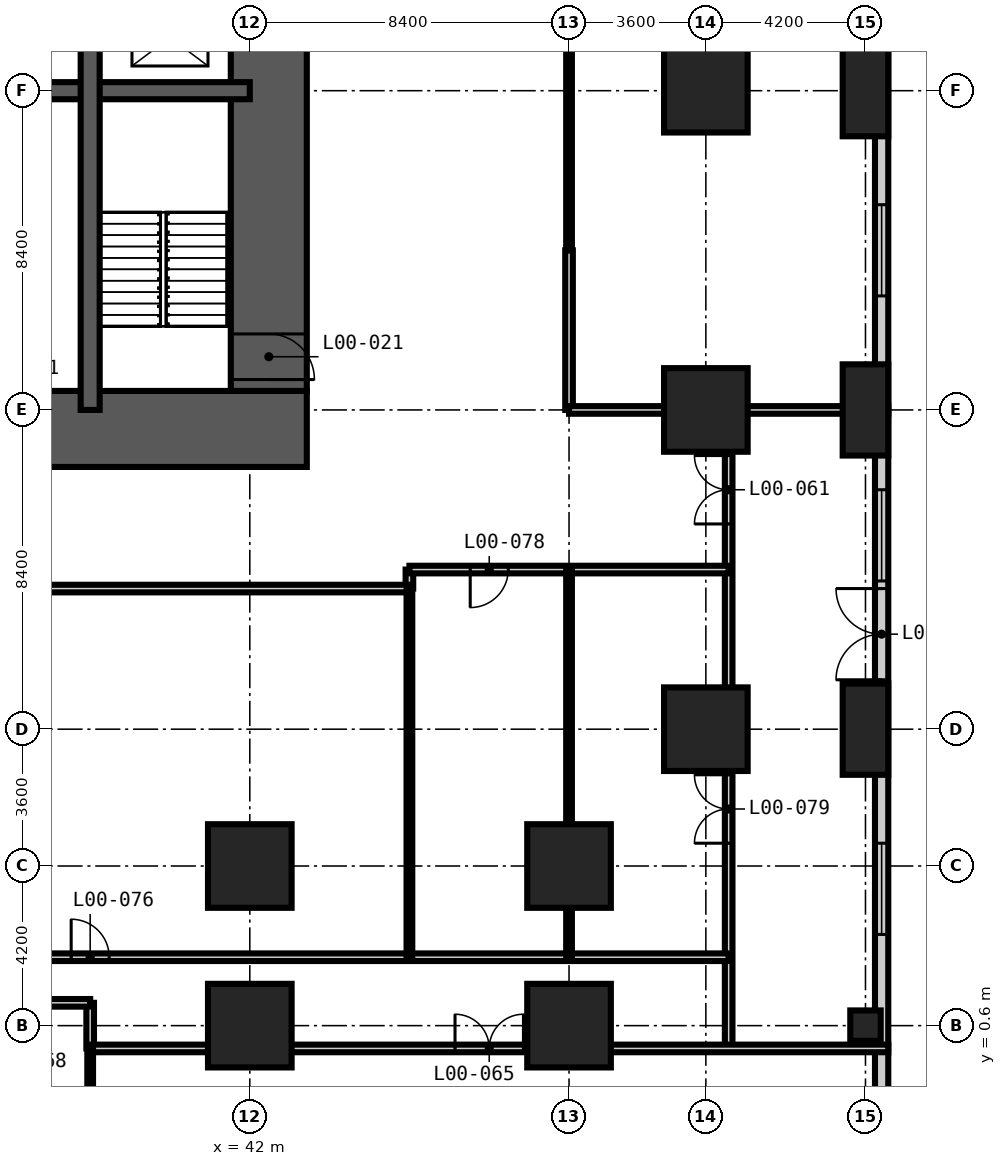
"""IFC4 building model, lengths in metres.
Left out: names, types, materials, properties, quantities, classifications, styles, units other than length and angle.
Written with IfcOpenShell. Run it as: python <this file> out.ifc"""

import sys

from ifc_helpers import new_model, si_unit, direction, frame, frame_2d, origin, origin_2d, place, context, subcontext, project, spatial, rectangle, extrude, element, fill, save


model = new_model("IFC4")
c1 = context("Model", 3, precision=1e-05, world=origin(), true_north=direction((0.0, 1.0)))
c2 = subcontext(c1, "Body", "Model", "MODEL_VIEW")
j1 = project(units=[si_unit("LENGTHUNIT", "METRE"), si_unit("PLANEANGLEUNIT", "RADIAN")], contexts=[c1])
p1 = place(None, origin())
s1 = spatial("IfcSite", under=j1, at=p1, CompositionType="ELEMENT")
p2 = place(p1, origin())
s2 = spatial("IfcBuilding", under=s1, at=p2, CompositionType="ELEMENT")
p3 = place(p2, origin())
s3 = spatial("IfcBuildingStorey", under=s2, at=p3, CompositionType="ELEMENT", Elevation=0.0)
for number, where, z_axis, x_axis in (
    (1, (42.0, 0.6, -0.3), (0.0, 0.0, 1.0), (1.0, 0.0, 0.0)),
    (2, (42.0, 4.8, -0.3), (0.0, 0.0, 1.0), (1.0, 0.0, 0.0)),
    (3, (50.4, 0.6, -0.3), (0.0, 0.0, 1.0), (1.0, 0.0, 0.0)),
    (4, (50.4, 4.8, -0.3), (0.0, 0.0, 1.0), (1.0, 0.0, 0.0)),
    (5, (54.0, 8.4, -0.3), (0.0, 0.0, 1.0), (1.0, 0.0, 0.0)),
    (6, (54.0, 16.8, -0.3), (0.0, 0.0, 1.0), (1.0, 0.0, 0.0)),
    (7, (54.0, 25.2, -0.3), (0.0, 0.0, 1.0), (1.0, 0.0, 0.0)),
):
    element("IfcColumn", number, at=place(p3, frame(where, z_axis=z_axis, x_axis=x_axis)), inside=s3, PredefinedType="COLUMN", context=c2, shape_type="SweptSolid", body=[
        extrude(rectangle(XDim=2.2, YDim=2.2, at=origin_2d()), origin(), (0.0, 0.0, 1.0), 6.0),
    ])
for number, where, z_axis, x_axis in (
    (8, (58.2, 8.4, -0.3), (0.0, 0.0, 1.0), (1.0, 0.0, 0.0)),
    (9, (58.2, 16.8, -0.3), (0.0, 0.0, 1.0), (1.0, 0.0, 0.0)),
    (10, (58.2, 25.2, -0.3), (0.0, 0.0, 1.0), (1.0, 0.0, 0.0)),
):
    element("IfcColumn", number, at=place(p3, frame(where, z_axis=z_axis, x_axis=x_axis)), inside=s3, PredefinedType="COLUMN", context=c2, shape_type="SweptSolid", body=[
        extrude(rectangle(XDim=1.2, YDim=2.4, at=origin_2d()), origin(), (0.0, 0.0, 1.0), 6.0),
    ])
p4 = place(p3, frame((58.2, 0.6, -0.3), z_axis=(0.0, 0.0, 1.0), x_axis=(1.0, 0.0, 0.0)))
e11 = element("IfcColumn", 11, at=p4, inside=s3, PredefinedType="COLUMN", context=c2, shape_type="SweptSolid", body=[
    extrude(rectangle(XDim=0.8, YDim=0.8, at=origin_2d()), origin(), (0.0, 0.0, 1.0), 6.0),
])
p5 = place(p3, frame((15.3, 16.3, -0.3), z_axis=(0.0, 0.0, 1.0), x_axis=(1.0, 0.0, 0.0)))
e12 = element("IfcWall", 12, at=p5, inside=s3, PredefinedType="SHEAR", context=c2, shape_type="SweptSolid", body=[
    extrude(rectangle(XDim=28.2, YDim=2.0, at=frame_2d((14.1, 0.0))), origin(), (0.0, 0.0, 1.0), 6.0),
])
p6 = place(p5, frame((13.6, 0.0, 0.3)))
e13 = element("IfcOpeningElement", 13, at=p6, cuts=e12, PredefinedType="OPENING", context=c2, shape_type="SweptSolid", body=[
    extrude(rectangle(XDim=1.0, YDim=2.1, at=frame_2d((0.5, 1.05))), frame((0.0, 1.01, 0.0), z_axis=(0.0, -1.0, 0.0), x_axis=(1.0, 0.0, 0.0)), (0.0, 0.0, 1.0), 2.02),
])
p7 = place(p5, frame((19.9, 0.0, 0.3)))
e14 = element("IfcOpeningElement", 14, at=p7, cuts=e12, PredefinedType="OPENING", context=c2, shape_type="SweptSolid", body=[
    extrude(rectangle(XDim=1.0, YDim=2.1, at=frame_2d((0.5, 1.05))), frame((0.0, 1.01, 0.0), z_axis=(0.0, -1.0, 0.0), x_axis=(1.0, 0.0, 0.0)), (0.0, 0.0, 1.0), 2.02),
])
p8 = place(p3, frame((42.5, 17.3, -0.3), z_axis=(0.0, 0.0, 1.0), x_axis=(0.0, 1.0, 0.0)))
e15 = element("IfcWall", 15, at=p8, inside=s3, PredefinedType="SHEAR", context=c2, shape_type="SweptSolid", body=[
    extrude(rectangle(XDim=24.2, YDim=2.0, at=frame_2d((12.1, 0.0))), origin(), (0.0, 0.0, 1.0), 6.0),
])
p9 = place(p8, frame((0.3, 0.0, 0.3)))
e16 = element("IfcOpeningElement", 16, at=p9, cuts=e15, PredefinedType="OPENING", context=c2, shape_type="SweptSolid", body=[
    extrude(rectangle(XDim=1.2, YDim=2.2, at=frame_2d((0.6, 1.1))), frame((0.0, 1.01, 0.0), z_axis=(0.0, -1.0, 0.0), x_axis=(1.0, 0.0, 0.0)), (0.0, 0.0, 1.0), 2.02),
])
p10 = place(p8, frame((11.2, 0.0, 0.3)))
e17 = element("IfcOpeningElement", 17, at=p10, cuts=e15, PredefinedType="OPENING", context=c2, shape_type="SweptSolid", body=[
    extrude(rectangle(XDim=1.8, YDim=2.2, at=frame_2d((0.9, 1.1))), frame((0.0, 1.01, 0.0), z_axis=(0.0, -1.0, 0.0), x_axis=(1.0, 0.0, 0.0)), (0.0, 0.0, 1.0), 2.02),
])
p11 = place(p8, frame((20.0, 0.0, 0.3)))
e18 = element("IfcOpeningElement", 18, at=p11, cuts=e15, PredefinedType="OPENING", context=c2, shape_type="SweptSolid", body=[
    extrude(rectangle(XDim=1.0, YDim=2.1, at=frame_2d((0.5, 1.05))), frame((0.0, 1.01, 0.0), z_axis=(0.0, -1.0, 0.0), x_axis=(1.0, 0.0, 0.0)), (0.0, 0.0, 1.0), 2.02),
])
p12 = place(p3, frame((58.625, -8.4, 0.0), z_axis=(0.0, 0.0, 1.0), x_axis=(0.0, 1.0, 0.0)))
e19 = element("IfcWall", 19, at=p12, inside=s3, PredefinedType="SOLIDWALL", context=c2, shape_type="SweptSolid", body=[
    extrude(rectangle(XDim=67.2, YDim=0.35, at=frame_2d((33.6, 0.0))), origin(), (0.0, 0.0, 1.0), 5.7),
])
p13 = place(p12, frame((3.0, 0.0, 0.9)))
e20 = element("IfcOpeningElement", 20, at=p13, cuts=e19, PredefinedType="OPENING", context=c2, shape_type="SweptSolid", body=[
    extrude(rectangle(XDim=2.4, YDim=2.4, at=frame_2d((1.2, 1.2))), frame((0.0, 0.185, 0.0), z_axis=(0.0, -1.0, 0.0), x_axis=(1.0, 0.0, 0.0)), (0.0, 0.0, 1.0), 0.37),
])
p14 = place(p12, frame((18.1, 0.0, 0.0)))
e21 = element("IfcOpeningElement", 21, at=p14, cuts=e19, PredefinedType="OPENING", context=c2, shape_type="SweptSolid", body=[
    extrude(rectangle(XDim=2.4, YDim=3.0, at=frame_2d((1.2, 1.5))), frame((0.0, 0.185, 0.0), z_axis=(0.0, -1.0, 0.0), x_axis=(1.0, 0.0, 0.0)), (0.0, 0.0, 1.0), 0.37),
])
p15 = place(p12, frame((11.4, 0.0, 0.9)))
e22 = element("IfcOpeningElement", 22, at=p15, cuts=e19, PredefinedType="OPENING", context=c2, shape_type="SweptSolid", body=[
    extrude(rectangle(XDim=2.4, YDim=2.4, at=frame_2d((1.2, 1.2))), frame((0.0, 0.185, 0.0), z_axis=(0.0, -1.0, 0.0), x_axis=(1.0, 0.0, 0.0)), (0.0, 0.0, 1.0), 0.37),
])
p16 = place(p12, frame((20.7, 0.0, 0.9)))
e23 = element("IfcOpeningElement", 23, at=p16, cuts=e19, PredefinedType="OPENING", context=c2, shape_type="SweptSolid", body=[
    extrude(rectangle(XDim=2.4, YDim=2.4, at=frame_2d((1.2, 1.2))), frame((0.0, 0.185, 0.0), z_axis=(0.0, -1.0, 0.0), x_axis=(1.0, 0.0, 0.0)), (0.0, 0.0, 1.0), 0.37),
])
p17 = place(p12, frame((28.2, 0.0, 0.9)))
e24 = element("IfcOpeningElement", 24, at=p17, cuts=e19, PredefinedType="OPENING", context=c2, shape_type="SweptSolid", body=[
    extrude(rectangle(XDim=2.4, YDim=2.4, at=frame_2d((1.2, 1.2))), frame((0.0, 0.185, 0.0), z_axis=(0.0, -1.0, 0.0), x_axis=(1.0, 0.0, 0.0)), (0.0, 0.0, 1.0), 0.37),
])
p18 = place(p12, frame((36.6, 0.0, 0.9)))
e25 = element("IfcOpeningElement", 25, at=p18, cuts=e19, PredefinedType="OPENING", context=c2, shape_type="SweptSolid", body=[
    extrude(rectangle(XDim=2.4, YDim=2.4, at=frame_2d((1.2, 1.2))), frame((0.0, 0.185, 0.0), z_axis=(0.0, -1.0, 0.0), x_axis=(1.0, 0.0, 0.0)), (0.0, 0.0, 1.0), 0.37),
])
p19 = place(p12, frame((45.0, 0.0, 0.9)))
e26 = element("IfcOpeningElement", 26, at=p19, cuts=e19, PredefinedType="OPENING", context=c2, shape_type="SweptSolid", body=[
    extrude(rectangle(XDim=2.4, YDim=2.4, at=frame_2d((1.2, 1.2))), frame((0.0, 0.185, 0.0), z_axis=(0.0, -1.0, 0.0), x_axis=(1.0, 0.0, 0.0)), (0.0, 0.0, 1.0), 0.37),
])
p20 = place(p12, frame((60.1, 0.0, 0.0)))
e27 = element("IfcOpeningElement", 27, at=p20, cuts=e19, PredefinedType="OPENING", context=c2, shape_type="SweptSolid", body=[
    extrude(rectangle(XDim=3.6, YDim=4.5, at=frame_2d((1.8, 2.25))), frame((0.0, 0.185, 0.0), z_axis=(0.0, -1.0, 0.0), x_axis=(1.0, 0.0, 0.0)), (0.0, 0.0, 1.0), 0.37),
])
p21 = place(p12, frame((53.4, 0.0, 0.9)))
e28 = element("IfcOpeningElement", 28, at=p21, cuts=e19, PredefinedType="OPENING", context=c2, shape_type="SweptSolid", body=[
    extrude(rectangle(XDim=2.4, YDim=2.4, at=frame_2d((1.2, 1.2))), frame((0.0, 0.185, 0.0), z_axis=(0.0, -1.0, 0.0), x_axis=(1.0, 0.0, 0.0)), (0.0, 0.0, 1.0), 0.37),
])
p22 = place(p3, frame((16.8, 25.2, -0.3), z_axis=(0.0, 0.0, 1.0), x_axis=(1.0, 0.0, 0.0)))
e29 = element("IfcWall", 29, at=p22, inside=s3, PredefinedType="SHEAR", context=c2, shape_type="SweptSolid", body=[
    extrude(rectangle(XDim=25.2, YDim=0.45, at=frame_2d((12.6, 0.0))), origin(), (0.0, 0.0, 1.0), 6.0),
])
p23 = place(p3, frame((37.8, 16.8, -0.3), z_axis=(0.0, 0.0, 1.0), x_axis=(0.0, 1.0, 0.0)))
e30 = element("IfcWall", 30, at=p23, inside=s3, PredefinedType="SHEAR", context=c2, shape_type="SweptSolid", body=[
    extrude(rectangle(XDim=11.2, YDim=0.5, at=frame_2d((5.6, 0.0))), origin(), (0.0, 0.0, 1.0), 6.0),
])
p24 = place(p3, frame((37.8, 0.0, 0.0), z_axis=(0.0, 0.0, 1.0), x_axis=(0.0, 1.0, 0.0)))
e31 = element("IfcWall", 31, at=p24, inside=s3, PredefinedType="PARTITIONING", context=c2, shape_type="SweptSolid", body=[
    extrude(rectangle(XDim=1.2, YDim=0.2, at=frame_2d((0.6, 0.0))), origin(), (0.0, 0.0, 1.0), 5.7),
])
p25 = place(p3, frame((46.2, 12.1, 0.0), z_axis=(0.0, 0.0, 1.0), x_axis=(0.0, 1.0, 0.0)))
e32 = element("IfcWall", 32, at=p25, inside=s3, PredefinedType="PARTITIONING", context=c2, shape_type="SweptSolid", body=[
    extrude(rectangle(XDim=0.5, YDim=0.2, at=frame_2d((0.25, 0.0))), origin(), (0.0, 0.0, 1.0), 5.7),
])
p26 = place(p3, frame((50.4, 16.8, 0.0), z_axis=(0.0, 0.0, 1.0), x_axis=(0.0, 1.0, 0.0)))
e33 = element("IfcWall", 33, at=p26, inside=s3, PredefinedType="PARTITIONING", context=c2, shape_type="SweptSolid", body=[
    extrude(rectangle(XDim=4.2, YDim=0.2, at=frame_2d((2.1, 0.0))), origin(), (0.0, 0.0, 1.0), 5.7),
])
p27 = place(p3, frame((54.6, 0.0, 0.0), z_axis=(0.0, 0.0, 1.0), x_axis=(0.0, 1.0, 0.0)))
e34 = element("IfcWall", 34, at=p27, inside=s3, PredefinedType="PARTITIONING", context=c2, shape_type="SweptSolid", body=[
    extrude(rectangle(XDim=16.8, YDim=0.2, at=frame_2d((8.4, 0.0))), origin(), (0.0, 0.0, 1.0), 5.7),
])
p28 = place(p27, frame((13.8, 0.0, 0.0)))
e35 = element("IfcOpeningElement", 35, at=p28, cuts=e34, PredefinedType="OPENING", context=c2, shape_type="SweptSolid", body=[
    extrude(rectangle(XDim=1.8, YDim=2.4, at=frame_2d((0.9, 1.2))), frame((0.0, 0.11, 0.0), z_axis=(0.0, -1.0, 0.0), x_axis=(1.0, 0.0, 0.0)), (0.0, 0.0, 1.0), 0.22),
])
p29 = place(p27, frame((5.4, 0.0, 0.0)))
e36 = element("IfcOpeningElement", 36, at=p29, cuts=e34, PredefinedType="OPENING", context=c2, shape_type="SweptSolid", body=[
    extrude(rectangle(XDim=1.8, YDim=2.4, at=frame_2d((0.9, 1.2))), frame((0.0, 0.11, 0.0), z_axis=(0.0, -1.0, 0.0), x_axis=(1.0, 0.0, 0.0)), (0.0, 0.0, 1.0), 0.22),
])
p30 = place(p3, frame((37.8, 0.0, 0.0), z_axis=(0.0, 0.0, 1.0), x_axis=(1.0, 0.0, 0.0)))
e37 = element("IfcWall", 37, at=p30, inside=s3, PredefinedType="PARTITIONING", context=c2, shape_type="SweptSolid", body=[
    extrude(rectangle(XDim=21.0, YDim=0.2, at=frame_2d((10.5, 0.0))), origin(), (0.0, 0.0, 1.0), 5.7),
])
p31 = place(p30, frame((9.6, 0.0, 0.0)))
e38 = element("IfcOpeningElement", 38, at=p31, cuts=e37, PredefinedType="OPENING", context=c2, shape_type="SweptSolid", body=[
    extrude(rectangle(XDim=1.8, YDim=2.4, at=frame_2d((0.9, 1.2))), frame((0.0, 0.11, 0.0), z_axis=(0.0, -1.0, 0.0), x_axis=(1.0, 0.0, 0.0)), (0.0, 0.0, 1.0), 0.22),
])
p32 = place(p3, frame((33.6, 1.2, 0.0), z_axis=(0.0, 0.0, 1.0), x_axis=(1.0, 0.0, 0.0)))
e39 = element("IfcWall", 39, at=p32, inside=s3, PredefinedType="PARTITIONING", context=c2, shape_type="SweptSolid", body=[
    extrude(rectangle(XDim=4.2, YDim=0.2, at=frame_2d((2.1, 0.0))), origin(), (0.0, 0.0, 1.0), 5.7),
])
p33 = place(p32, frame((1.6, 0.0, 0.0)))
e40 = element("IfcOpeningElement", 40, at=p33, cuts=e39, PredefinedType="OPENING", context=c2, shape_type="SweptSolid", body=[
    extrude(rectangle(XDim=1.0, YDim=2.1, at=frame_2d((0.5, 1.05))), frame((0.0, 0.11, 0.0), z_axis=(0.0, -1.0, 0.0), x_axis=(1.0, 0.0, 0.0)), (0.0, 0.0, 1.0), 0.22),
])
p34 = place(p3, frame((0.0, 2.4, 0.0), z_axis=(0.0, 0.0, 1.0), x_axis=(1.0, 0.0, 0.0)))
e41 = element("IfcWall", 41, at=p34, inside=s3, PredefinedType="PARTITIONING", context=c2, shape_type="SweptSolid", body=[
    extrude(rectangle(XDim=54.6, YDim=0.2, at=frame_2d((27.3, 0.0))), origin(), (0.0, 0.0, 1.0), 5.7),
])
p35 = place(p34, frame((5.8, 0.0, 0.0)))
e42 = element("IfcOpeningElement", 42, at=p35, cuts=e41, PredefinedType="OPENING", context=c2, shape_type="SweptSolid", body=[
    extrude(rectangle(XDim=1.0, YDim=2.1, at=frame_2d((0.5, 1.05))), frame((0.0, 0.11, 0.0), z_axis=(0.0, -1.0, 0.0), x_axis=(1.0, 0.0, 0.0)), (0.0, 0.0, 1.0), 0.22),
])
p36 = place(p34, frame((18.4, 0.0, 0.0)))
e43 = element("IfcOpeningElement", 43, at=p36, cuts=e41, PredefinedType="OPENING", context=c2, shape_type="SweptSolid", body=[
    extrude(rectangle(XDim=1.0, YDim=2.1, at=frame_2d((0.5, 1.05))), frame((0.0, 0.11, 0.0), z_axis=(0.0, -1.0, 0.0), x_axis=(1.0, 0.0, 0.0)), (0.0, 0.0, 1.0), 0.22),
])
p37 = place(p34, frame((28.9, 0.0, 0.0)))
e44 = element("IfcOpeningElement", 44, at=p37, cuts=e41, PredefinedType="OPENING", context=c2, shape_type="SweptSolid", body=[
    extrude(rectangle(XDim=1.0, YDim=2.1, at=frame_2d((0.5, 1.05))), frame((0.0, 0.11, 0.0), z_axis=(0.0, -1.0, 0.0), x_axis=(1.0, 0.0, 0.0)), (0.0, 0.0, 1.0), 0.22),
])
p38 = place(p34, frame((37.3, 0.0, 0.0)))
e45 = element("IfcOpeningElement", 45, at=p38, cuts=e41, PredefinedType="OPENING", context=c2, shape_type="SweptSolid", body=[
    extrude(rectangle(XDim=1.0, YDim=2.1, at=frame_2d((0.5, 1.05))), frame((0.0, 0.11, 0.0), z_axis=(0.0, -1.0, 0.0), x_axis=(1.0, 0.0, 0.0)), (0.0, 0.0, 1.0), 0.22),
])
p39 = place(p3, frame((12.6, 12.1, 0.0), z_axis=(0.0, 0.0, 1.0), x_axis=(1.0, 0.0, 0.0)))
e46 = element("IfcWall", 46, at=p39, inside=s3, PredefinedType="PARTITIONING", context=c2, shape_type="SweptSolid", body=[
    extrude(rectangle(XDim=33.6, YDim=0.2, at=frame_2d((16.8, 0.0))), origin(), (0.0, 0.0, 1.0), 5.7),
])
p40 = place(p3, frame((46.2, 12.6, 0.0), z_axis=(0.0, 0.0, 1.0), x_axis=(1.0, 0.0, 0.0)))
e47 = element("IfcWall", 47, at=p40, inside=s3, PredefinedType="PARTITIONING", context=c2, shape_type="SweptSolid", body=[
    extrude(rectangle(XDim=8.4, YDim=0.2, at=frame_2d((4.2, 0.0))), origin(), (0.0, 0.0, 1.0), 5.7),
])
p41 = place(p40, frame((1.6, 0.0, 0.0)))
e48 = element("IfcOpeningElement", 48, at=p41, cuts=e47, PredefinedType="OPENING", context=c2, shape_type="SweptSolid", body=[
    extrude(rectangle(XDim=1.0, YDim=2.1, at=frame_2d((0.5, 1.05))), frame((0.0, 0.11, 0.0), z_axis=(0.0, -1.0, 0.0), x_axis=(1.0, 0.0, 0.0)), (0.0, 0.0, 1.0), 0.22),
])
p42 = place(p3, frame((50.4, 16.8, 0.0), z_axis=(0.0, 0.0, 1.0), x_axis=(1.0, 0.0, 0.0)))
e49 = element("IfcWall", 49, at=p42, inside=s3, PredefinedType="PARTITIONING", context=c2, shape_type="SweptSolid", body=[
    extrude(rectangle(XDim=8.4, YDim=0.2, at=frame_2d((4.2, 0.0))), origin(), (0.0, 0.0, 1.0), 5.7),
])
p43 = place(p3, frame((37.8, -8.4, 0.0), z_axis=(0.0, 0.0, 1.0), x_axis=(0.0, 1.0, 0.0)))
e50 = element("IfcWall", 50, at=p43, inside=s3, PredefinedType="PARTITIONING", context=c2, shape_type="SweptSolid", body=[
    extrude(rectangle(XDim=8.4, YDim=0.15, at=frame_2d((4.2, 0.0))), origin(), (0.0, 0.0, 1.0), 5.7),
])
p44 = place(p3, frame((46.2, 2.4, 0.0), z_axis=(0.0, 0.0, 1.0), x_axis=(0.0, 1.0, 0.0)))
e51 = element("IfcWall", 51, at=p44, inside=s3, PredefinedType="PARTITIONING", context=c2, shape_type="SweptSolid", body=[
    extrude(rectangle(XDim=9.7, YDim=0.15, at=frame_2d((4.85, 0.0))), origin(), (0.0, 0.0, 1.0), 5.7),
])
p45 = place(p3, frame((50.4, 2.4, 0.0), z_axis=(0.0, 0.0, 1.0), x_axis=(0.0, 1.0, 0.0)))
e52 = element("IfcWall", 52, at=p45, inside=s3, PredefinedType="PARTITIONING", context=c2, shape_type="SweptSolid", body=[
    extrude(rectangle(XDim=10.2, YDim=0.15, at=frame_2d((5.1, 0.0))), origin(), (0.0, 0.0, 1.0), 5.7),
])
p46 = place(p3, frame((50.4, 21.0, 0.0), z_axis=(0.0, 0.0, 1.0), x_axis=(0.0, 1.0, 0.0)))
e53 = element("IfcWall", 53, at=p46, inside=s3, PredefinedType="PARTITIONING", context=c2, shape_type="SweptSolid", body=[
    extrude(rectangle(XDim=12.6, YDim=0.15, at=frame_2d((6.3, 0.0))), origin(), (0.0, 0.0, 1.0), 5.7),
])
p47 = place(p46, frame((5.8, 0.0, 0.0)))
e54 = element("IfcOpeningElement", 54, at=p47, cuts=e53, PredefinedType="OPENING", context=c2, shape_type="SweptSolid", body=[
    extrude(rectangle(XDim=1.0, YDim=2.1, at=frame_2d((0.5, 1.05))), frame((0.0, 0.085, 0.0), z_axis=(0.0, -1.0, 0.0), x_axis=(1.0, 0.0, 0.0)), (0.0, 0.0, 1.0), 0.17),
])
p48 = place(p14, origin())
e55 = element("IfcDoor", 55, at=p48, inside=s3, OperationType="DOUBLE_DOOR_DOUBLE_SWING", PredefinedType="DOOR", context=c2, shape_type="SweptSolid", body=[
    extrude(rectangle(XDim=2.4, YDim=3.0, at=frame_2d((1.2, 1.5))), frame((0.0, 0.025, 0.0), z_axis=(0.0, -1.0, 0.0), x_axis=(1.0, 0.0, 0.0)), (0.0, 0.0, 1.0), 0.05),
])
fill(e21, e55)
p49 = place(p15, origin())
e56 = element("IfcWindow", 56, at=p49, inside=s3, PartitioningType="SINGLE_PANEL", PredefinedType="WINDOW", context=c2, shape_type="SweptSolid", body=[
    extrude(rectangle(XDim=2.4, YDim=2.4, at=frame_2d((1.2, 1.2))), frame((0.0, 0.03, 0.0), z_axis=(0.0, -1.0, 0.0), x_axis=(1.0, 0.0, 0.0)), (0.0, 0.0, 1.0), 0.06),
])
fill(e22, e56)
p50 = place(p16, origin())
e57 = element("IfcWindow", 57, at=p50, inside=s3, PartitioningType="SINGLE_PANEL", PredefinedType="WINDOW", context=c2, shape_type="SweptSolid", body=[
    extrude(rectangle(XDim=2.4, YDim=2.4, at=frame_2d((1.2, 1.2))), frame((0.0, 0.03, 0.0), z_axis=(0.0, -1.0, 0.0), x_axis=(1.0, 0.0, 0.0)), (0.0, 0.0, 1.0), 0.06),
])
fill(e23, e57)
p51 = place(p17, origin())
e58 = element("IfcWindow", 58, at=p51, inside=s3, PartitioningType="SINGLE_PANEL", PredefinedType="WINDOW", context=c2, shape_type="SweptSolid", body=[
    extrude(rectangle(XDim=2.4, YDim=2.4, at=frame_2d((1.2, 1.2))), frame((0.0, 0.03, 0.0), z_axis=(0.0, -1.0, 0.0), x_axis=(1.0, 0.0, 0.0)), (0.0, 0.0, 1.0), 0.06),
])
fill(e24, e58)
p52 = place(p9, frame((1.2, 0.0, 0.0), z_axis=(0.0, 0.0, 1.0), x_axis=(-1.0, 0.0, 0.0)))
e59 = element("IfcDoor", 59, at=p52, inside=s3, OperationType="SINGLE_SWING_RIGHT", PredefinedType="DOOR", context=c2, shape_type="SweptSolid", body=[
    extrude(rectangle(XDim=1.2, YDim=2.2, at=frame_2d((0.6, 1.1))), frame((0.0, 0.025, 0.0), z_axis=(0.0, -1.0, 0.0), x_axis=(1.0, 0.0, 0.0)), (0.0, 0.0, 1.0), 0.05),
])
fill(e16, e59)
p53 = place(p28, origin())
e60 = element("IfcDoor", 60, at=p53, inside=s3, OperationType="DOUBLE_DOOR_DOUBLE_SWING", PredefinedType="DOOR", context=c2, shape_type="SweptSolid", body=[
    extrude(rectangle(XDim=1.8, YDim=2.4, at=frame_2d((0.9, 1.2))), frame((0.0, 0.025, 0.0), z_axis=(0.0, -1.0, 0.0), x_axis=(1.0, 0.0, 0.0)), (0.0, 0.0, 1.0), 0.05),
])
fill(e35, e60)
p54 = place(p31, origin())
e61 = element("IfcDoor", 61, at=p54, inside=s3, OperationType="DOUBLE_DOOR_DOUBLE_SWING", PredefinedType="DOOR", context=c2, shape_type="SweptSolid", body=[
    extrude(rectangle(XDim=1.8, YDim=2.4, at=frame_2d((0.9, 1.2))), frame((0.0, 0.025, 0.0), z_axis=(0.0, -1.0, 0.0), x_axis=(1.0, 0.0, 0.0)), (0.0, 0.0, 1.0), 0.05),
])
fill(e38, e61)
p55 = place(p38, origin())
e62 = element("IfcDoor", 62, at=p55, inside=s3, OperationType="SINGLE_SWING_LEFT", PredefinedType="DOOR", context=c2, shape_type="SweptSolid", body=[
    extrude(rectangle(XDim=1.0, YDim=2.1, at=frame_2d((0.5, 1.05))), frame((0.0, 0.025, 0.0), z_axis=(0.0, -1.0, 0.0), x_axis=(1.0, 0.0, 0.0)), (0.0, 0.0, 1.0), 0.05),
])
fill(e45, e62)
p56 = place(p41, frame((1.0, 0.0, 0.0), z_axis=(0.0, 0.0, 1.0), x_axis=(-1.0, 0.0, 0.0)))
e63 = element("IfcDoor", 63, at=p56, inside=s3, OperationType="SINGLE_SWING_RIGHT", PredefinedType="DOOR", context=c2, shape_type="SweptSolid", body=[
    extrude(rectangle(XDim=1.0, YDim=2.1, at=frame_2d((0.5, 1.05))), frame((0.0, 0.025, 0.0), z_axis=(0.0, -1.0, 0.0), x_axis=(1.0, 0.0, 0.0)), (0.0, 0.0, 1.0), 0.05),
])
fill(e48, e63)
p57 = place(p29, origin())
e64 = element("IfcDoor", 64, at=p57, inside=s3, OperationType="DOUBLE_DOOR_DOUBLE_SWING", PredefinedType="DOOR", context=c2, shape_type="SweptSolid", body=[
    extrude(rectangle(XDim=1.8, YDim=2.4, at=frame_2d((0.9, 1.2))), frame((0.0, 0.025, 0.0), z_axis=(0.0, -1.0, 0.0), x_axis=(1.0, 0.0, 0.0)), (0.0, 0.0, 1.0), 0.05),
])
fill(e36, e64)
save(model, sys.argv[1])
